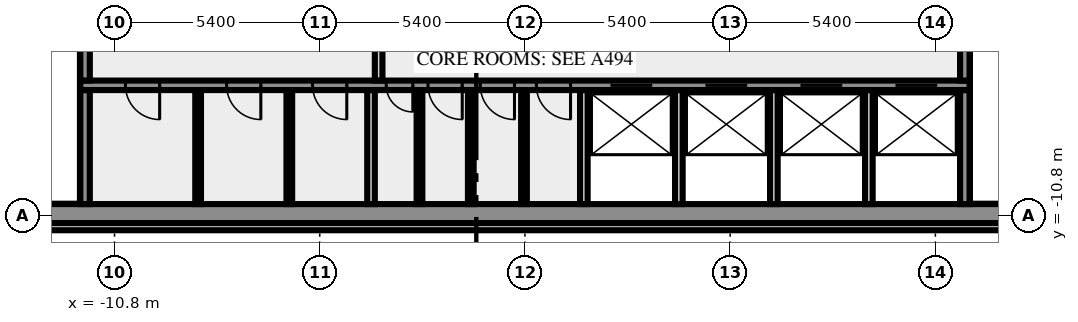
"""IFC4 building model, lengths in metres.
Left out: names, types, materials, properties, quantities, classifications, styles, units other than length and angle.
Written with IfcOpenShell. Run it as: python <this file> out.ifc"""

import sys

from ifc_helpers import new_model, si_unit, direction, frame, frame_2d, origin, place, context, subcontext, project, spatial, rectangle, extrude, element, fill, save


model = new_model("IFC4")
c1 = context("Model", 3, precision=1e-05, world=origin(), true_north=direction((0.0, 1.0)))
c2 = subcontext(c1, "Body", "Model", "MODEL_VIEW")
j1 = project(units=[si_unit("LENGTHUNIT", "METRE"), si_unit("PLANEANGLEUNIT", "RADIAN")], contexts=[c1])
p1 = place(None, origin())
s1 = spatial("IfcSite", under=j1, at=p1, CompositionType="ELEMENT")
p2 = place(p1, origin())
s2 = spatial("IfcBuilding", under=s1, at=p2, CompositionType="ELEMENT")
p3 = place(p2, frame((0.0, 0.0, 210.0)))
s3 = spatial("IfcBuildingStorey", under=s2, at=p3, CompositionType="ELEMENT", Elevation=210.0)
p4 = place(p3, frame((-17.444, -11.088, 0.0), z_axis=(0.0, 0.0, 1.0), x_axis=(1.0, 0.0, 0.0)))
e1 = element("IfcWall", 1, at=p4, inside=s3, PredefinedType="SOLIDWALL", context=c2, shape_type="SweptSolid", body=[
    extrude(rectangle(XDim=34.888, YDim=0.2, at=frame_2d((17.444, 0.0))), origin(), (0.0, 0.0, 1.0), 3.65),
])
p5 = place(p3, frame((-20.0, -10.75, 0.0), z_axis=(0.0, 0.0, 1.0), x_axis=(1.0, 0.0, 0.0)))
e2 = element("IfcWall", 2, at=p5, inside=s3, PredefinedType="SHEAR", context=c2, shape_type="SweptSolid", body=[
    extrude(rectangle(XDim=40.0, YDim=0.5, at=frame_2d((20.0, 0.0))), origin(), (0.0, 0.0, 1.0), 3.65),
])
p6 = place(p5, frame((0.8, 0.0, 1.0)))
e3 = element("IfcOpeningElement", 3, at=p6, cuts=e2, PredefinedType="OPENING", context=c2, shape_type="SweptSolid", body=[
    extrude(rectangle(XDim=1.2, YDim=1.2, at=frame_2d((0.6, 0.6))), frame((0.0, 0.26, 0.0), z_axis=(0.0, -1.0, 0.0), x_axis=(1.0, 0.0, 0.0)), (0.0, 0.0, 1.0), 0.52),
])
p7 = place(p5, frame((38.0, 0.0, 1.0)))
e4 = element("IfcOpeningElement", 4, at=p7, cuts=e2, PredefinedType="OPENING", context=c2, shape_type="SweptSolid", body=[
    extrude(rectangle(XDim=1.2, YDim=1.2, at=frame_2d((0.6, 0.6))), frame((0.0, 0.26, 0.0), z_axis=(0.0, -1.0, 0.0), x_axis=(1.0, 0.0, 0.0)), (0.0, 0.0, 1.0), 0.52),
])
p8 = place(p3, frame((-11.575, -10.5, 0.0), z_axis=(0.0, 0.0, 1.0), x_axis=(0.0, 1.0, 0.0)))
e5 = element("IfcWall", 5, at=p8, inside=s3, PredefinedType="SHEAR", context=c2, shape_type="SweptSolid", body=[
    extrude(rectangle(XDim=3.0, YDim=0.25, at=frame_2d((1.5, 0.0))), origin(), (0.0, 0.0, 1.0), 3.65),
])
for number, where, z_axis, x_axis in (
    (6, (-8.6, -10.5, 0.0), (0.0, 0.0, 1.0), (0.0, 1.0, 0.0)),
    (7, (-6.2, -10.5, 0.0), (0.0, 0.0, 1.0), (0.0, 1.0, 0.0)),
):
    element("IfcWall", number, at=place(p3, frame(where, z_axis=z_axis, x_axis=x_axis)), inside=s3, PredefinedType="PARTITIONING", context=c2, shape_type="SweptSolid", body=[
        extrude(rectangle(XDim=3.0, YDim=0.15, at=frame_2d((1.5, 0.0))), origin(), (0.0, 0.0, 1.0), 3.65),
    ])
p9 = place(p3, frame((-4.05, -10.5, 0.0), z_axis=(0.0, 0.0, 1.0), x_axis=(0.0, 1.0, 0.0)))
e8 = element("IfcWall", 8, at=p9, inside=s3, PredefinedType="SOLIDWALL", context=c2, shape_type="SweptSolid", body=[
    extrude(rectangle(XDim=3.0, YDim=0.2, at=frame_2d((1.5, 0.0))), origin(), (0.0, 0.0, 1.0), 3.65),
])
for number, where, z_axis, x_axis in (
    (9, (-2.775, -10.5, 0.0), (0.0, 0.0, 1.0), (0.0, 1.0, 0.0)),
    (10, (-1.425, -10.5, 0.0), (0.0, 0.0, 1.0), (0.0, 1.0, 0.0)),
    (11, (-0.025, -10.5, 0.0), (0.0, 0.0, 1.0), (0.0, 1.0, 0.0)),
):
    element("IfcWall", number, at=place(p3, frame(where, z_axis=z_axis, x_axis=x_axis)), inside=s3, PredefinedType="PARTITIONING", context=c2, shape_type="SweptSolid", body=[
        extrude(rectangle(XDim=3.0, YDim=0.15, at=frame_2d((1.5, 0.0))), origin(), (0.0, 0.0, 1.0), 3.65),
    ])
for number, where, z_axis, x_axis in (
    (12, (1.55, -10.5, 0.0), (0.0, 0.0, 1.0), (0.0, 1.0, 0.0)),
    (13, (4.05, -10.5, 0.0), (0.0, 0.0, 1.0), (0.0, 1.0, 0.0)),
    (14, (6.55, -10.5, 0.0), (0.0, 0.0, 1.0), (0.0, 1.0, 0.0)),
    (15, (9.05, -10.5, 0.0), (0.0, 0.0, 1.0), (0.0, 1.0, 0.0)),
):
    element("IfcWall", number, at=place(p3, frame(where, z_axis=z_axis, x_axis=x_axis)), inside=s3, PredefinedType="SOLIDWALL", context=c2, shape_type="SweptSolid", body=[
        extrude(rectangle(XDim=3.0, YDim=0.2, at=frame_2d((1.5, 0.0))), origin(), (0.0, 0.0, 1.0), 3.65),
    ])
p10 = place(p3, frame((11.575, -10.5, 0.0), z_axis=(0.0, 0.0, 1.0), x_axis=(0.0, 1.0, 0.0)))
e16 = element("IfcWall", 16, at=p10, inside=s3, PredefinedType="SHEAR", context=c2, shape_type="SweptSolid", body=[
    extrude(rectangle(XDim=3.0, YDim=0.25, at=frame_2d((1.5, 0.0))), origin(), (0.0, 0.0, 1.0), 3.65),
])
p11 = place(p3, frame((11.7, -7.375, 0.0), z_axis=(0.0, 0.0, 1.0), x_axis=(-1.0, 0.0, 0.0)))
e17 = element("IfcWall", 17, at=p11, inside=s3, PredefinedType="SHEAR", context=c2, shape_type="SweptSolid", body=[
    extrude(rectangle(XDim=23.4, YDim=0.25, at=frame_2d((11.7, 0.0))), origin(), (0.0, 0.0, 1.0), 3.65),
])
p12 = place(p11, frame((21.312, 0.0, 0.0)))
e18 = element("IfcOpeningElement", 18, at=p12, cuts=e17, PredefinedType="OPENING", context=c2, shape_type="SweptSolid", body=[
    extrude(rectangle(XDim=0.9, YDim=2.1, at=frame_2d((0.45, 1.05))), frame((0.0, 0.135, 0.0), z_axis=(0.0, -1.0, 0.0), x_axis=(1.0, 0.0, 0.0)), (0.0, 0.0, 1.0), 0.27),
])
p13 = place(p11, frame((18.65, 0.0, 0.0)))
e19 = element("IfcOpeningElement", 19, at=p13, cuts=e17, PredefinedType="OPENING", context=c2, shape_type="SweptSolid", body=[
    extrude(rectangle(XDim=0.9, YDim=2.1, at=frame_2d((0.45, 1.05))), frame((0.0, 0.135, 0.0), z_axis=(0.0, -1.0, 0.0), x_axis=(1.0, 0.0, 0.0)), (0.0, 0.0, 1.0), 0.27),
])
p14 = place(p11, frame((16.388, 0.0, 0.0)))
e20 = element("IfcOpeningElement", 20, at=p14, cuts=e17, PredefinedType="OPENING", context=c2, shape_type="SweptSolid", body=[
    extrude(rectangle(XDim=0.9, YDim=2.1, at=frame_2d((0.45, 1.05))), frame((0.0, 0.135, 0.0), z_axis=(0.0, -1.0, 0.0), x_axis=(1.0, 0.0, 0.0)), (0.0, 0.0, 1.0), 0.27),
])
p15 = place(p11, frame((14.65, 0.0, 0.0)))
e21 = element("IfcOpeningElement", 21, at=p15, cuts=e17, PredefinedType="OPENING", context=c2, shape_type="SweptSolid", body=[
    extrude(rectangle(XDim=0.7, YDim=2.1, at=frame_2d((0.35, 1.05))), frame((0.0, 0.135, 0.0), z_axis=(0.0, -1.0, 0.0), x_axis=(1.0, 0.0, 0.0)), (0.0, 0.0, 1.0), 0.27),
])
p16 = place(p11, frame((13.35, 0.0, 0.0)))
e22 = element("IfcOpeningElement", 22, at=p16, cuts=e17, PredefinedType="OPENING", context=c2, shape_type="SweptSolid", body=[
    extrude(rectangle(XDim=0.9, YDim=2.1, at=frame_2d((0.45, 1.05))), frame((0.0, 0.135, 0.0), z_axis=(0.0, -1.0, 0.0), x_axis=(1.0, 0.0, 0.0)), (0.0, 0.0, 1.0), 0.27),
])
p17 = place(p11, frame((11.975, 0.0, 0.0)))
e23 = element("IfcOpeningElement", 23, at=p17, cuts=e17, PredefinedType="OPENING", context=c2, shape_type="SweptSolid", body=[
    extrude(rectangle(XDim=0.9, YDim=2.1, at=frame_2d((0.45, 1.05))), frame((0.0, 0.135, 0.0), z_axis=(0.0, -1.0, 0.0), x_axis=(1.0, 0.0, 0.0)), (0.0, 0.0, 1.0), 0.27),
])
p18 = place(p11, frame((10.5, 0.0, 0.0)))
e24 = element("IfcOpeningElement", 24, at=p18, cuts=e17, PredefinedType="OPENING", context=c2, shape_type="SweptSolid", body=[
    extrude(rectangle(XDim=0.9, YDim=2.1, at=frame_2d((0.45, 1.05))), frame((0.0, 0.135, 0.0), z_axis=(0.0, -1.0, 0.0), x_axis=(1.0, 0.0, 0.0)), (0.0, 0.0, 1.0), 0.27),
])
p19 = place(p11, frame((8.35, 0.0, 0.0)))
e25 = element("IfcOpeningElement", 25, at=p19, cuts=e17, PredefinedType="OPENING", context=c2, shape_type="SweptSolid", body=[
    extrude(rectangle(XDim=1.1, YDim=2.1, at=frame_2d((0.55, 1.05))), frame((0.0, 0.135, 0.0), z_axis=(0.0, -1.0, 0.0), x_axis=(1.0, 0.0, 0.0)), (0.0, 0.0, 1.0), 0.27),
])
p20 = place(p11, frame((5.85, 0.0, 0.0)))
e26 = element("IfcOpeningElement", 26, at=p20, cuts=e17, PredefinedType="OPENING", context=c2, shape_type="SweptSolid", body=[
    extrude(rectangle(XDim=1.1, YDim=2.1, at=frame_2d((0.55, 1.05))), frame((0.0, 0.135, 0.0), z_axis=(0.0, -1.0, 0.0), x_axis=(1.0, 0.0, 0.0)), (0.0, 0.0, 1.0), 0.27),
])
p21 = place(p11, frame((3.35, 0.0, 0.0)))
e27 = element("IfcOpeningElement", 27, at=p21, cuts=e17, PredefinedType="OPENING", context=c2, shape_type="SweptSolid", body=[
    extrude(rectangle(XDim=1.1, YDim=2.1, at=frame_2d((0.55, 1.05))), frame((0.0, 0.135, 0.0), z_axis=(0.0, -1.0, 0.0), x_axis=(1.0, 0.0, 0.0)), (0.0, 0.0, 1.0), 0.27),
])
p22 = place(p11, frame((0.85, 0.0, 0.0)))
e28 = element("IfcOpeningElement", 28, at=p22, cuts=e17, PredefinedType="OPENING", context=c2, shape_type="SweptSolid", body=[
    extrude(rectangle(XDim=1.1, YDim=2.1, at=frame_2d((0.55, 1.05))), frame((0.0, 0.135, 0.0), z_axis=(0.0, -1.0, 0.0), x_axis=(1.0, 0.0, 0.0)), (0.0, 0.0, 1.0), 0.27),
])
p23 = place(p3, frame((-11.575, -7.25, 0.0), z_axis=(0.0, 0.0, 1.0), x_axis=(0.0, 1.0, 0.0)))
e29 = element("IfcWall", 29, at=p23, inside=s3, PredefinedType="SHEAR", context=c2, shape_type="SweptSolid", body=[
    extrude(rectangle(XDim=1.0, YDim=0.25, at=frame_2d((0.5, 0.0))), origin(), (0.0, 0.0, 1.0), 3.65),
])
p24 = place(p3, frame((-3.85, -4.25, 0.0), z_axis=(0.0, 0.0, 1.0), x_axis=(0.0, -1.0, 0.0)))
e30 = element("IfcWall", 30, at=p24, inside=s3, PredefinedType="SOLIDWALL", context=c2, shape_type="SweptSolid", body=[
    extrude(rectangle(XDim=3.0, YDim=0.2, at=frame_2d((1.5, 0.0))), origin(), (0.0, 0.0, 1.0), 3.65),
])
p25 = place(p24, frame((0.8, 0.0, 0.0)))
e31 = element("IfcOpeningElement", 31, at=p25, cuts=e30, PredefinedType="OPENING", context=c2, shape_type="SweptSolid", body=[
    extrude(rectangle(XDim=1.4, YDim=2.1, at=frame_2d((0.7, 1.05))), frame((0.0, 0.11, 0.0), z_axis=(0.0, -1.0, 0.0), x_axis=(1.0, 0.0, 0.0)), (0.0, 0.0, 1.0), 0.22),
])
p26 = place(p3, frame((11.575, -7.25, 0.0), z_axis=(0.0, 0.0, 1.0), x_axis=(0.0, 1.0, 0.0)))
e32 = element("IfcWall", 32, at=p26, inside=s3, PredefinedType="SHEAR", context=c2, shape_type="SweptSolid", body=[
    extrude(rectangle(XDim=1.0, YDim=0.25, at=frame_2d((0.5, 0.0))), origin(), (0.0, 0.0, 1.0), 3.65),
])
p27 = place(p12, origin())
e33 = element("IfcDoor", 33, at=p27, inside=s3, OperationType="SINGLE_SWING_RIGHT", PredefinedType="DOOR", context=c2, shape_type="SweptSolid", body=[
    extrude(rectangle(XDim=0.9, YDim=2.1, at=frame_2d((0.45, 1.05))), frame((0.0, 0.025, 0.0), z_axis=(0.0, -1.0, 0.0), x_axis=(1.0, 0.0, 0.0)), (0.0, 0.0, 1.0), 0.05),
])
fill(e18, e33)
p28 = place(p13, origin())
e34 = element("IfcDoor", 34, at=p28, inside=s3, OperationType="SINGLE_SWING_RIGHT", PredefinedType="DOOR", context=c2, shape_type="SweptSolid", body=[
    extrude(rectangle(XDim=0.9, YDim=2.1, at=frame_2d((0.45, 1.05))), frame((0.0, 0.025, 0.0), z_axis=(0.0, -1.0, 0.0), x_axis=(1.0, 0.0, 0.0)), (0.0, 0.0, 1.0), 0.05),
])
fill(e19, e34)
p29 = place(p14, origin())
e35 = element("IfcDoor", 35, at=p29, inside=s3, OperationType="SINGLE_SWING_RIGHT", PredefinedType="DOOR", context=c2, shape_type="SweptSolid", body=[
    extrude(rectangle(XDim=0.9, YDim=2.1, at=frame_2d((0.45, 1.05))), frame((0.0, 0.025, 0.0), z_axis=(0.0, -1.0, 0.0), x_axis=(1.0, 0.0, 0.0)), (0.0, 0.0, 1.0), 0.05),
])
fill(e20, e35)
p30 = place(p15, origin())
e36 = element("IfcDoor", 36, at=p30, inside=s3, OperationType="SINGLE_SWING_RIGHT", PredefinedType="DOOR", context=c2, shape_type="SweptSolid", body=[
    extrude(rectangle(XDim=0.7, YDim=2.1, at=frame_2d((0.35, 1.05))), frame((0.0, 0.025, 0.0), z_axis=(0.0, -1.0, 0.0), x_axis=(1.0, 0.0, 0.0)), (0.0, 0.0, 1.0), 0.05),
])
fill(e21, e36)
p31 = place(p16, origin())
e37 = element("IfcDoor", 37, at=p31, inside=s3, OperationType="SINGLE_SWING_RIGHT", PredefinedType="DOOR", context=c2, shape_type="SweptSolid", body=[
    extrude(rectangle(XDim=0.9, YDim=2.1, at=frame_2d((0.45, 1.05))), frame((0.0, 0.025, 0.0), z_axis=(0.0, -1.0, 0.0), x_axis=(1.0, 0.0, 0.0)), (0.0, 0.0, 1.0), 0.05),
])
fill(e22, e37)
p32 = place(p17, origin())
e38 = element("IfcDoor", 38, at=p32, inside=s3, OperationType="SINGLE_SWING_RIGHT", PredefinedType="DOOR", context=c2, shape_type="SweptSolid", body=[
    extrude(rectangle(XDim=0.9, YDim=2.1, at=frame_2d((0.45, 1.05))), frame((0.0, 0.025, 0.0), z_axis=(0.0, -1.0, 0.0), x_axis=(1.0, 0.0, 0.0)), (0.0, 0.0, 1.0), 0.05),
])
fill(e23, e38)
p33 = place(p18, origin())
e39 = element("IfcDoor", 39, at=p33, inside=s3, OperationType="SINGLE_SWING_LEFT", PredefinedType="DOOR", context=c2, shape_type="SweptSolid", body=[
    extrude(rectangle(XDim=0.9, YDim=2.1, at=frame_2d((0.45, 1.05))), frame((0.0, 0.025, 0.0), z_axis=(0.0, -1.0, 0.0), x_axis=(1.0, 0.0, 0.0)), (0.0, 0.0, 1.0), 0.05),
])
fill(e24, e39)
p34 = place(p19, origin())
e40 = element("IfcDoor", 40, at=p34, inside=s3, OperationType="DOUBLE_DOOR_SLIDING", PredefinedType="DOOR", context=c2, shape_type="SweptSolid", body=[
    extrude(rectangle(XDim=1.1, YDim=2.1, at=frame_2d((0.55, 1.05))), frame((0.0, 0.025, 0.0), z_axis=(0.0, -1.0, 0.0), x_axis=(1.0, 0.0, 0.0)), (0.0, 0.0, 1.0), 0.05),
])
fill(e25, e40)
p35 = place(p20, origin())
e41 = element("IfcDoor", 41, at=p35, inside=s3, OperationType="DOUBLE_DOOR_SLIDING", PredefinedType="DOOR", context=c2, shape_type="SweptSolid", body=[
    extrude(rectangle(XDim=1.1, YDim=2.1, at=frame_2d((0.55, 1.05))), frame((0.0, 0.025, 0.0), z_axis=(0.0, -1.0, 0.0), x_axis=(1.0, 0.0, 0.0)), (0.0, 0.0, 1.0), 0.05),
])
fill(e26, e41)
p36 = place(p21, origin())
e42 = element("IfcDoor", 42, at=p36, inside=s3, OperationType="DOUBLE_DOOR_SLIDING", PredefinedType="DOOR", context=c2, shape_type="SweptSolid", body=[
    extrude(rectangle(XDim=1.1, YDim=2.1, at=frame_2d((0.55, 1.05))), frame((0.0, 0.025, 0.0), z_axis=(0.0, -1.0, 0.0), x_axis=(1.0, 0.0, 0.0)), (0.0, 0.0, 1.0), 0.05),
])
fill(e27, e42)
p37 = place(p22, origin())
e43 = element("IfcDoor", 43, at=p37, inside=s3, OperationType="DOUBLE_DOOR_SLIDING", PredefinedType="DOOR", context=c2, shape_type="SweptSolid", body=[
    extrude(rectangle(XDim=1.1, YDim=2.1, at=frame_2d((0.55, 1.05))), frame((0.0, 0.025, 0.0), z_axis=(0.0, -1.0, 0.0), x_axis=(1.0, 0.0, 0.0)), (0.0, 0.0, 1.0), 0.05),
])
fill(e28, e43)
save(model, sys.argv[1])
